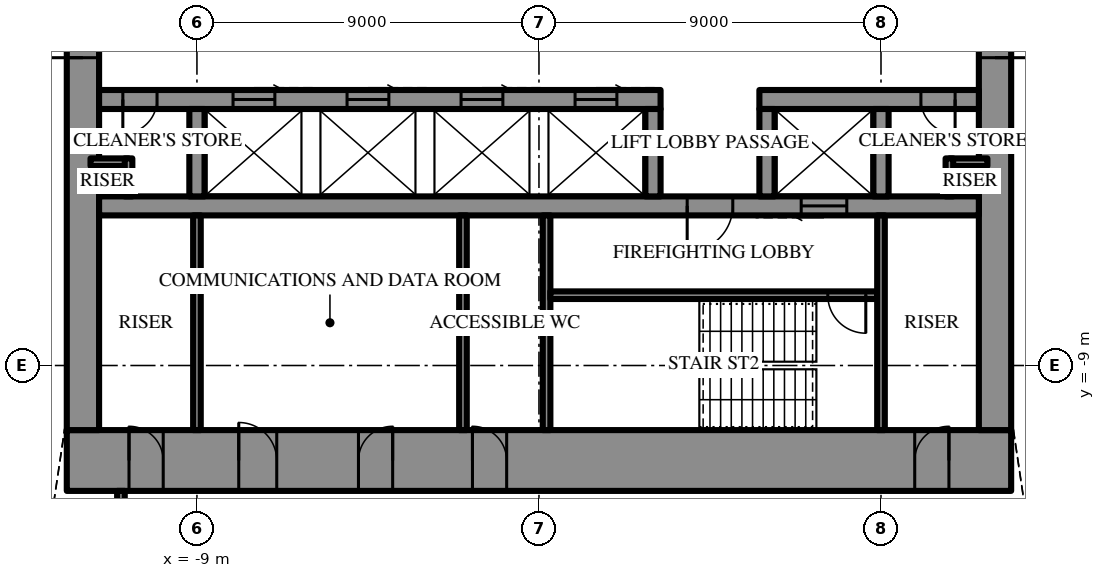
"""IFC4 building model, lengths in metres.
Left out: names, types, materials, properties, quantities, classifications, styles, units other than length and angle.
Written with IfcOpenShell. Run it as: python <this file> out.ifc"""

import sys

from ifc_helpers import new_model, si_unit, direction, frame, frame_2d, origin, place, context, subcontext, project, spatial, rectangle, extrude, element, fill, save


model = new_model("IFC4")
c1 = context("Model", 3, precision=1e-05, world=origin(), true_north=direction((0.0, 1.0)))
c2 = subcontext(c1, "Body", "Model", "MODEL_VIEW")
j1 = project(units=[si_unit("LENGTHUNIT", "METRE"), si_unit("PLANEANGLEUNIT", "RADIAN")], contexts=[c1])
p1 = place(None, origin())
s1 = spatial("IfcSite", under=j1, at=p1, CompositionType="ELEMENT")
p2 = place(p1, origin())
s2 = spatial("IfcBuilding", under=s1, at=p2, CompositionType="ELEMENT")
p3 = place(p2, frame((0.0, 0.0, 319.9)))
s3 = spatial("IfcBuildingStorey", under=s2, at=p3, CompositionType="ELEMENT", Elevation=319.9)
p4 = place(p3, frame((12.425, -11.5, 0.0), z_axis=(0.0, 0.0, 1.0), x_axis=(-1.0, 0.0, 0.0)))
e1 = element("IfcWall", 1, at=p4, inside=s3, PredefinedType="SHEAR", context=c2, shape_type="SweptSolid", body=[
    extrude(rectangle(XDim=24.85, YDim=1.6, at=frame_2d((12.425, 0.0))), origin(), (0.0, 0.0, 1.0), 4.2),
])
p5 = place(p4, frame((13.275, 0.0, 0.0)))
e2 = element("IfcOpeningElement", 2, at=p5, cuts=e1, PredefinedType="OPENING", context=c2, shape_type="SweptSolid", body=[
    extrude(rectangle(XDim=0.9, YDim=2.2, at=frame_2d((0.45, 1.1))), frame((0.0, 0.81, 0.0), z_axis=(0.0, -1.0, 0.0), x_axis=(1.0, 0.0, 0.0)), (0.0, 0.0, 1.0), 1.62),
])
p6 = place(p4, frame((16.275, 0.0, 0.0)))
e3 = element("IfcOpeningElement", 3, at=p6, cuts=e1, PredefinedType="OPENING", context=c2, shape_type="SweptSolid", body=[
    extrude(rectangle(XDim=0.9, YDim=2.2, at=frame_2d((0.45, 1.1))), frame((0.0, 0.81, 0.0), z_axis=(0.0, -1.0, 0.0), x_axis=(1.0, 0.0, 0.0)), (0.0, 0.0, 1.0), 1.62),
])
p7 = place(p4, frame((19.325, 0.0, 0.0)))
e4 = element("IfcOpeningElement", 4, at=p7, cuts=e1, PredefinedType="OPENING", context=c2, shape_type="SweptSolid", body=[
    extrude(rectangle(XDim=1.0, YDim=2.2, at=frame_2d((0.5, 1.1))), frame((0.0, 0.81, 0.0), z_axis=(0.0, -1.0, 0.0), x_axis=(1.0, 0.0, 0.0)), (0.0, 0.0, 1.0), 1.62),
])
p8 = place(p4, frame((1.637, 0.0, 0.0)))
e5 = element("IfcOpeningElement", 5, at=p8, cuts=e1, PredefinedType="OPENING", context=c2, shape_type="SweptSolid", body=[
    extrude(rectangle(XDim=0.9, YDim=2.2, at=frame_2d((0.45, 1.1))), frame((0.0, 0.81, 0.0), z_axis=(0.0, -1.0, 0.0), x_axis=(1.0, 0.0, 0.0)), (0.0, 0.0, 1.0), 1.62),
])
p9 = place(p4, frame((22.312, 0.0, 0.0)))
e6 = element("IfcOpeningElement", 6, at=p9, cuts=e1, PredefinedType="OPENING", context=c2, shape_type="SweptSolid", body=[
    extrude(rectangle(XDim=0.9, YDim=2.2, at=frame_2d((0.45, 1.1))), frame((0.0, 0.81, 0.0), z_axis=(0.0, -1.0, 0.0), x_axis=(1.0, 0.0, 0.0)), (0.0, 0.0, 1.0), 1.62),
])
p10 = place(p3, frame((12.0, -10.7, 0.0), z_axis=(0.0, 0.0, 1.0), x_axis=(0.0, 1.0, 0.0)))
e7 = element("IfcWall", 7, at=p10, inside=s3, PredefinedType="SHEAR", context=c2, shape_type="SweptSolid", body=[
    extrude(rectangle(XDim=21.4, YDim=0.85, at=frame_2d((10.7, 0.0))), origin(), (0.0, 0.0, 1.0), 4.2),
])
p11 = place(p10, frame((9.8, 0.0, 0.0)))
e8 = element("IfcOpeningElement", 8, at=p11, cuts=e7, PredefinedType="OPENING", context=c2, shape_type="SweptSolid", body=[
    extrude(rectangle(XDim=1.8, YDim=2.4, at=frame_2d((0.9, 1.2))), frame((0.0, 0.435, 0.0), z_axis=(0.0, -1.0, 0.0), x_axis=(1.0, 0.0, 0.0)), (0.0, 0.0, 1.0), 0.87),
])
p12 = place(p3, frame((-12.0, 10.7, 0.0), z_axis=(0.0, 0.0, 1.0), x_axis=(0.0, -1.0, 0.0)))
e9 = element("IfcWall", 9, at=p12, inside=s3, PredefinedType="SHEAR", context=c2, shape_type="SweptSolid", body=[
    extrude(rectangle(XDim=21.4, YDim=0.85, at=frame_2d((10.7, 0.0))), origin(), (0.0, 0.0, 1.0), 4.2),
])
p13 = place(p12, frame((9.8, 0.0, 0.0)))
e10 = element("IfcOpeningElement", 10, at=p13, cuts=e9, PredefinedType="OPENING", context=c2, shape_type="SweptSolid", body=[
    extrude(rectangle(XDim=1.8, YDim=2.4, at=frame_2d((0.9, 1.2))), frame((0.0, 0.435, 0.0), z_axis=(0.0, -1.0, 0.0), x_axis=(1.0, 0.0, 0.0)), (0.0, 0.0, 1.0), 0.87),
])
p14 = place(p3, frame((11.575, -2.0, 0.0), z_axis=(0.0, 0.0, 1.0), x_axis=(-1.0, 0.0, 0.0)))
e11 = element("IfcWall", 11, at=p14, inside=s3, PredefinedType="SHEAR", context=c2, shape_type="SweptSolid", body=[
    extrude(rectangle(XDim=5.775, YDim=0.5, at=frame_2d((2.887, 0.0))), origin(), (0.0, 0.0, 1.0), 4.2),
])
p15 = place(p14, frame((0.625, 0.0, 0.0)))
e12 = element("IfcOpeningElement", 12, at=p15, cuts=e11, PredefinedType="OPENING", context=c2, shape_type="SweptSolid", body=[
    extrude(rectangle(XDim=0.9, YDim=2.2, at=frame_2d((0.45, 1.1))), frame((0.0, 0.26, 0.0), z_axis=(0.0, -1.0, 0.0), x_axis=(1.0, 0.0, 0.0)), (0.0, 0.0, 1.0), 0.52),
])
p16 = place(p3, frame((3.2, -2.0, 0.0), z_axis=(0.0, 0.0, 1.0), x_axis=(-1.0, 0.0, 0.0)))
e13 = element("IfcWall", 13, at=p16, inside=s3, PredefinedType="SHEAR", context=c2, shape_type="SweptSolid", body=[
    extrude(rectangle(XDim=14.775, YDim=0.5, at=frame_2d((7.387, 0.0))), origin(), (0.0, 0.0, 1.0), 4.2),
])
p17 = place(p16, frame((13.25, 0.0, 0.0)))
e14 = element("IfcOpeningElement", 14, at=p17, cuts=e13, PredefinedType="OPENING", context=c2, shape_type="SweptSolid", body=[
    extrude(rectangle(XDim=0.9, YDim=2.2, at=frame_2d((0.45, 1.1))), frame((0.0, 0.26, 0.0), z_axis=(0.0, -1.0, 0.0), x_axis=(1.0, 0.0, 0.0)), (0.0, 0.0, 1.0), 0.52),
])
p18 = place(p16, frame((1.15, 0.0, 0.0)))
e15 = element("IfcOpeningElement", 15, at=p18, cuts=e13, PredefinedType="OPENING", context=c2, shape_type="SweptSolid", body=[
    extrude(rectangle(XDim=1.1, YDim=2.2, at=frame_2d((0.55, 1.1))), frame((0.0, 0.26, 0.0), z_axis=(0.0, -1.0, 0.0), x_axis=(1.0, 0.0, 0.0)), (0.0, 0.0, 1.0), 0.52),
])
p19 = place(p16, frame((4.15, 0.0, 0.0)))
e16 = element("IfcOpeningElement", 16, at=p19, cuts=e13, PredefinedType="OPENING", context=c2, shape_type="SweptSolid", body=[
    extrude(rectangle(XDim=1.1, YDim=2.2, at=frame_2d((0.55, 1.1))), frame((0.0, 0.26, 0.0), z_axis=(0.0, -1.0, 0.0), x_axis=(1.0, 0.0, 0.0)), (0.0, 0.0, 1.0), 0.52),
])
p20 = place(p16, frame((7.15, 0.0, 0.0)))
e17 = element("IfcOpeningElement", 17, at=p20, cuts=e13, PredefinedType="OPENING", context=c2, shape_type="SweptSolid", body=[
    extrude(rectangle(XDim=1.1, YDim=2.2, at=frame_2d((0.55, 1.1))), frame((0.0, 0.26, 0.0), z_axis=(0.0, -1.0, 0.0), x_axis=(1.0, 0.0, 0.0)), (0.0, 0.0, 1.0), 0.52),
])
p21 = place(p16, frame((10.15, 0.0, 0.0)))
e18 = element("IfcOpeningElement", 18, at=p21, cuts=e13, PredefinedType="OPENING", context=c2, shape_type="SweptSolid", body=[
    extrude(rectangle(XDim=1.1, YDim=2.2, at=frame_2d((0.55, 1.1))), frame((0.0, 0.26, 0.0), z_axis=(0.0, -1.0, 0.0), x_axis=(1.0, 0.0, 0.0)), (0.0, 0.0, 1.0), 0.52),
])
p22 = place(p3, frame((11.575, -4.8, 0.0), z_axis=(0.0, 0.0, 1.0), x_axis=(-1.0, 0.0, 0.0)))
e19 = element("IfcWall", 19, at=p22, inside=s3, PredefinedType="SHEAR", context=c2, shape_type="SweptSolid", body=[
    extrude(rectangle(XDim=23.15, YDim=0.5, at=frame_2d((11.575, 0.0))), origin(), (0.0, 0.0, 1.0), 4.2),
])
p23 = place(p22, frame((6.475, 0.0, 0.0)))
e20 = element("IfcOpeningElement", 20, at=p23, cuts=e19, PredefinedType="OPENING", context=c2, shape_type="SweptSolid", body=[
    extrude(rectangle(XDim=1.2, YDim=2.2, at=frame_2d((0.6, 1.1))), frame((0.0, 0.26, 0.0), z_axis=(0.0, -1.0, 0.0), x_axis=(1.0, 0.0, 0.0)), (0.0, 0.0, 1.0), 0.52),
])
p24 = place(p22, frame((3.475, 0.0, 0.0)))
e21 = element("IfcOpeningElement", 21, at=p24, cuts=e19, PredefinedType="OPENING", context=c2, shape_type="SweptSolid", body=[
    extrude(rectangle(XDim=1.2, YDim=2.2, at=frame_2d((0.6, 1.1))), frame((0.0, 0.26, 0.0), z_axis=(0.0, -1.0, 0.0), x_axis=(1.0, 0.0, 0.0)), (0.0, 0.0, 1.0), 0.52),
])
for number, where, z_axis, x_axis in (
    (22, (9.0, -2.25, 0.0), (0.0, 0.0, 1.0), (0.0, -1.0, 0.0)),
    (23, (6.0, -2.25, 0.0), (0.0, 0.0, 1.0), (0.0, -1.0, 0.0)),
    (24, (3.0, -2.25, 0.0), (0.0, 0.0, 1.0), (0.0, -1.0, 0.0)),
    (25, (-9.0, -2.25, 0.0), (0.0, 0.0, 1.0), (0.0, -1.0, 0.0)),
):
    element("IfcWall", number, at=place(p3, frame(where, z_axis=z_axis, x_axis=x_axis)), inside=s3, PredefinedType="SHEAR", context=c2, shape_type="SweptSolid", body=[
        extrude(rectangle(XDim=2.3, YDim=0.4, at=frame_2d((1.15, 0.0))), origin(), (0.0, 0.0, 1.0), 4.2),
    ])
p25 = place(p3, frame((0.2, -5.05, 0.0), z_axis=(0.0, 0.0, 1.0), x_axis=(0.0, -1.0, 0.0)))
e26 = element("IfcWall", 26, at=p25, inside=s3, PredefinedType="SHEAR", context=c2, shape_type="SweptSolid", body=[
    extrude(rectangle(XDim=5.65, YDim=0.2, at=frame_2d((2.825, 0.0))), origin(), (0.0, 0.0, 1.0), 4.2),
])
p26 = place(p3, frame((8.9, -7.15, 0.0), z_axis=(0.0, 0.0, 1.0), x_axis=(-1.0, 0.0, 0.0)))
e27 = element("IfcWall", 27, at=p26, inside=s3, PredefinedType="SHEAR", context=c2, shape_type="SweptSolid", body=[
    extrude(rectangle(XDim=8.6, YDim=0.2, at=frame_2d((4.3, 0.0))), origin(), (0.0, 0.0, 1.0), 4.2),
])
p27 = place(p26, frame((0.3, 0.0, 0.0)))
e28 = element("IfcOpeningElement", 28, at=p27, cuts=e27, PredefinedType="OPENING", context=c2, shape_type="SweptSolid", body=[
    extrude(rectangle(XDim=1.0, YDim=2.2, at=frame_2d((0.5, 1.1))), frame((0.0, 0.11, 0.0), z_axis=(0.0, -1.0, 0.0), x_axis=(1.0, 0.0, 0.0)), (0.0, 0.0, 1.0), 0.22),
])
for number, where, z_axis, x_axis in (
    (29, (9.0, -5.05, 0.0), (0.0, 0.0, 1.0), (0.0, -1.0, 0.0)),
    (30, (-9.0, -5.05, 0.0), (0.0, 0.0, 1.0), (0.0, -1.0, 0.0)),
    (31, (-2.0, -5.05, 0.0), (0.0, 0.0, 1.0), (0.0, -1.0, 0.0)),
):
    element("IfcWall", number, at=place(p3, frame(where, z_axis=z_axis, x_axis=x_axis)), inside=s3, PredefinedType="PARTITIONING", context=c2, shape_type="SweptSolid", body=[
        extrude(rectangle(XDim=5.65, YDim=0.2, at=frame_2d((2.825, 0.0))), origin(), (0.0, 0.0, 1.0), 4.0),
    ])
for number, where, z_axis, x_axis in (
    (32, (11.8, -3.65, 0.0), (0.0, 0.0, 1.0), (-1.0, 0.0, 0.0)),
    (33, (10.8, -3.55, 0.0), (0.0, 0.0, 1.0), (0.0, -1.0, 0.0)),
    (34, (-10.8, -3.65, 0.0), (0.0, 0.0, 1.0), (-1.0, 0.0, 0.0)),
    (35, (-10.8, -3.55, 0.0), (0.0, 0.0, 1.0), (0.0, -1.0, 0.0)),
):
    element("IfcWall", number, at=place(p3, frame(where, z_axis=z_axis, x_axis=x_axis)), inside=s3, PredefinedType="PARTITIONING", context=c2, shape_type="SweptSolid", body=[
        extrude(rectangle(XDim=1.0, YDim=0.2, at=frame_2d((0.5, 0.0))), origin(), (0.0, 0.0, 1.0), 4.0),
    ])
p28 = place(p3, frame((-11.0, -12.3, 0.0), z_axis=(0.0, 0.0, 1.0), x_axis=(0.0, -1.0, 0.0)))
e36 = element("IfcWall", 36, at=p28, inside=s3, PredefinedType="PARTITIONING", context=c2, shape_type="SweptSolid", body=[
    extrude(rectangle(XDim=14.25, YDim=0.2, at=frame_2d((7.125, 0.0))), origin(), (0.0, 0.0, 1.0), 4.0),
])
p29 = place(p28, frame((0.925, 0.0, 0.0)))
e37 = element("IfcOpeningElement", 37, at=p29, cuts=e36, PredefinedType="OPENING", context=c2, shape_type="SweptSolid", body=[
    extrude(rectangle(XDim=1.0, YDim=2.2, at=frame_2d((0.5, 1.1))), frame((0.0, 0.11, 0.0), z_axis=(0.0, -1.0, 0.0), x_axis=(1.0, 0.0, 0.0)), (0.0, 0.0, 1.0), 0.22),
])
p30 = place(p11, frame((1.8, 0.0, 0.0), z_axis=(0.0, 0.0, 1.0), x_axis=(-1.0, 0.0, 0.0)))
e38 = element("IfcDoor", 38, at=p30, inside=s3, OperationType="DOUBLE_DOOR_SINGLE_SWING", PredefinedType="DOOR", context=c2, shape_type="SweptSolid", body=[
    extrude(rectangle(XDim=1.8, YDim=2.4, at=frame_2d((0.9, 1.2))), frame((0.0, 0.025, 0.0), z_axis=(0.0, -1.0, 0.0), x_axis=(1.0, 0.0, 0.0)), (0.0, 0.0, 1.0), 0.05),
])
fill(e8, e38)
p31 = place(p13, frame((1.8, 0.0, 0.0), z_axis=(0.0, 0.0, 1.0), x_axis=(-1.0, 0.0, 0.0)))
e39 = element("IfcDoor", 39, at=p31, inside=s3, OperationType="DOUBLE_DOOR_SINGLE_SWING", PredefinedType="DOOR", context=c2, shape_type="SweptSolid", body=[
    extrude(rectangle(XDim=1.8, YDim=2.4, at=frame_2d((0.9, 1.2))), frame((0.0, 0.025, 0.0), z_axis=(0.0, -1.0, 0.0), x_axis=(1.0, 0.0, 0.0)), (0.0, 0.0, 1.0), 0.05),
])
fill(e10, e39)
p32 = place(p23, origin())
e40 = element("IfcDoor", 40, at=p32, inside=s3, OperationType="SINGLE_SWING_LEFT", PredefinedType="DOOR", context=c2, shape_type="SweptSolid", body=[
    extrude(rectangle(XDim=1.2, YDim=2.2, at=frame_2d((0.6, 1.1))), frame((0.0, 0.025, 0.0), z_axis=(0.0, -1.0, 0.0), x_axis=(1.0, 0.0, 0.0)), (0.0, 0.0, 1.0), 0.05),
])
fill(e20, e40)
p33 = place(p27, origin())
e41 = element("IfcDoor", 41, at=p33, inside=s3, OperationType="SINGLE_SWING_RIGHT", PredefinedType="DOOR", context=c2, shape_type="SweptSolid", body=[
    extrude(rectangle(XDim=1.0, YDim=2.2, at=frame_2d((0.5, 1.1))), frame((0.0, 0.025, 0.0), z_axis=(0.0, -1.0, 0.0), x_axis=(1.0, 0.0, 0.0)), (0.0, 0.0, 1.0), 0.05),
])
fill(e28, e41)
p34 = place(p5, frame((0.9, 0.0, 0.0), z_axis=(0.0, 0.0, 1.0), x_axis=(-1.0, 0.0, 0.0)))
e42 = element("IfcDoor", 42, at=p34, inside=s3, OperationType="SINGLE_SWING_RIGHT", PredefinedType="DOOR", context=c2, shape_type="SweptSolid", body=[
    extrude(rectangle(XDim=0.9, YDim=2.2, at=frame_2d((0.45, 1.1))), frame((0.0, 0.025, 0.0), z_axis=(0.0, -1.0, 0.0), x_axis=(1.0, 0.0, 0.0)), (0.0, 0.0, 1.0), 0.05),
])
fill(e2, e42)
p35 = place(p6, frame((0.9, 0.0, 0.0), z_axis=(0.0, 0.0, 1.0), x_axis=(-1.0, 0.0, 0.0)))
e43 = element("IfcDoor", 43, at=p35, inside=s3, OperationType="SINGLE_SWING_LEFT", PredefinedType="DOOR", context=c2, shape_type="SweptSolid", body=[
    extrude(rectangle(XDim=0.9, YDim=2.2, at=frame_2d((0.45, 1.1))), frame((0.0, 0.025, 0.0), z_axis=(0.0, -1.0, 0.0), x_axis=(1.0, 0.0, 0.0)), (0.0, 0.0, 1.0), 0.05),
])
fill(e3, e43)
p36 = place(p7, frame((1.0, 0.0, 0.0), z_axis=(0.0, 0.0, 1.0), x_axis=(-1.0, 0.0, 0.0)))
e44 = element("IfcDoor", 44, at=p36, inside=s3, OperationType="SINGLE_SWING_RIGHT", PredefinedType="DOOR", context=c2, shape_type="SweptSolid", body=[
    extrude(rectangle(XDim=1.0, YDim=2.2, at=frame_2d((0.5, 1.1))), frame((0.0, 0.025, 0.0), z_axis=(0.0, -1.0, 0.0), x_axis=(1.0, 0.0, 0.0)), (0.0, 0.0, 1.0), 0.05),
])
fill(e4, e44)
p37 = place(p8, frame((0.9, 0.0, 0.0), z_axis=(0.0, 0.0, 1.0), x_axis=(-1.0, 0.0, 0.0)))
e45 = element("IfcDoor", 45, at=p37, inside=s3, OperationType="SINGLE_SWING_LEFT", PredefinedType="DOOR", context=c2, shape_type="SweptSolid", body=[
    extrude(rectangle(XDim=0.9, YDim=2.2, at=frame_2d((0.45, 1.1))), frame((0.0, 0.025, 0.0), z_axis=(0.0, -1.0, 0.0), x_axis=(1.0, 0.0, 0.0)), (0.0, 0.0, 1.0), 0.05),
])
fill(e5, e45)
p38 = place(p9, frame((0.9, 0.0, 0.0), z_axis=(0.0, 0.0, 1.0), x_axis=(-1.0, 0.0, 0.0)))
e46 = element("IfcDoor", 46, at=p38, inside=s3, OperationType="SINGLE_SWING_RIGHT", PredefinedType="DOOR", context=c2, shape_type="SweptSolid", body=[
    extrude(rectangle(XDim=0.9, YDim=2.2, at=frame_2d((0.45, 1.1))), frame((0.0, 0.025, 0.0), z_axis=(0.0, -1.0, 0.0), x_axis=(1.0, 0.0, 0.0)), (0.0, 0.0, 1.0), 0.05),
])
fill(e6, e46)
p39 = place(p15, origin())
e47 = element("IfcDoor", 47, at=p39, inside=s3, OperationType="SINGLE_SWING_RIGHT", PredefinedType="DOOR", context=c2, shape_type="SweptSolid", body=[
    extrude(rectangle(XDim=0.9, YDim=2.2, at=frame_2d((0.45, 1.1))), frame((0.0, 0.025, 0.0), z_axis=(0.0, -1.0, 0.0), x_axis=(1.0, 0.0, 0.0)), (0.0, 0.0, 1.0), 0.05),
])
fill(e12, e47)
p40 = place(p17, origin())
e48 = element("IfcDoor", 48, at=p40, inside=s3, OperationType="SINGLE_SWING_LEFT", PredefinedType="DOOR", context=c2, shape_type="SweptSolid", body=[
    extrude(rectangle(XDim=0.9, YDim=2.2, at=frame_2d((0.45, 1.1))), frame((0.0, 0.025, 0.0), z_axis=(0.0, -1.0, 0.0), x_axis=(1.0, 0.0, 0.0)), (0.0, 0.0, 1.0), 0.05),
])
fill(e14, e48)
p41 = place(p24, origin())
e49 = element("IfcDoor", 49, at=p41, inside=s3, OperationType="SLIDING_TO_LEFT", PredefinedType="DOOR", context=c2, shape_type="SweptSolid", body=[
    extrude(rectangle(XDim=1.2, YDim=2.2, at=frame_2d((0.6, 1.1))), frame((0.0, 0.025, 0.0), z_axis=(0.0, -1.0, 0.0), x_axis=(1.0, 0.0, 0.0)), (0.0, 0.0, 1.0), 0.05),
])
fill(e21, e49)
p42 = place(p18, frame((1.1, 0.0, 0.0), z_axis=(0.0, 0.0, 1.0), x_axis=(-1.0, 0.0, 0.0)))
e50 = element("IfcDoor", 50, at=p42, inside=s3, OperationType="SLIDING_TO_LEFT", PredefinedType="DOOR", context=c2, shape_type="SweptSolid", body=[
    extrude(rectangle(XDim=1.1, YDim=2.2, at=frame_2d((0.55, 1.1))), frame((0.0, 0.025, 0.0), z_axis=(0.0, -1.0, 0.0), x_axis=(1.0, 0.0, 0.0)), (0.0, 0.0, 1.0), 0.05),
])
fill(e15, e50)
p43 = place(p19, frame((1.1, 0.0, 0.0), z_axis=(0.0, 0.0, 1.0), x_axis=(-1.0, 0.0, 0.0)))
e51 = element("IfcDoor", 51, at=p43, inside=s3, OperationType="SLIDING_TO_LEFT", PredefinedType="DOOR", context=c2, shape_type="SweptSolid", body=[
    extrude(rectangle(XDim=1.1, YDim=2.2, at=frame_2d((0.55, 1.1))), frame((0.0, 0.025, 0.0), z_axis=(0.0, -1.0, 0.0), x_axis=(1.0, 0.0, 0.0)), (0.0, 0.0, 1.0), 0.05),
])
fill(e16, e51)
p44 = place(p20, frame((1.1, 0.0, 0.0), z_axis=(0.0, 0.0, 1.0), x_axis=(-1.0, 0.0, 0.0)))
e52 = element("IfcDoor", 52, at=p44, inside=s3, OperationType="SLIDING_TO_LEFT", PredefinedType="DOOR", context=c2, shape_type="SweptSolid", body=[
    extrude(rectangle(XDim=1.1, YDim=2.2, at=frame_2d((0.55, 1.1))), frame((0.0, 0.025, 0.0), z_axis=(0.0, -1.0, 0.0), x_axis=(1.0, 0.0, 0.0)), (0.0, 0.0, 1.0), 0.05),
])
fill(e17, e52)
p45 = place(p21, frame((1.1, 0.0, 0.0), z_axis=(0.0, 0.0, 1.0), x_axis=(-1.0, 0.0, 0.0)))
e53 = element("IfcDoor", 53, at=p45, inside=s3, OperationType="SLIDING_TO_LEFT", PredefinedType="DOOR", context=c2, shape_type="SweptSolid", body=[
    extrude(rectangle(XDim=1.1, YDim=2.2, at=frame_2d((0.55, 1.1))), frame((0.0, 0.025, 0.0), z_axis=(0.0, -1.0, 0.0), x_axis=(1.0, 0.0, 0.0)), (0.0, 0.0, 1.0), 0.05),
])
fill(e18, e53)
save(model, sys.argv[1])
